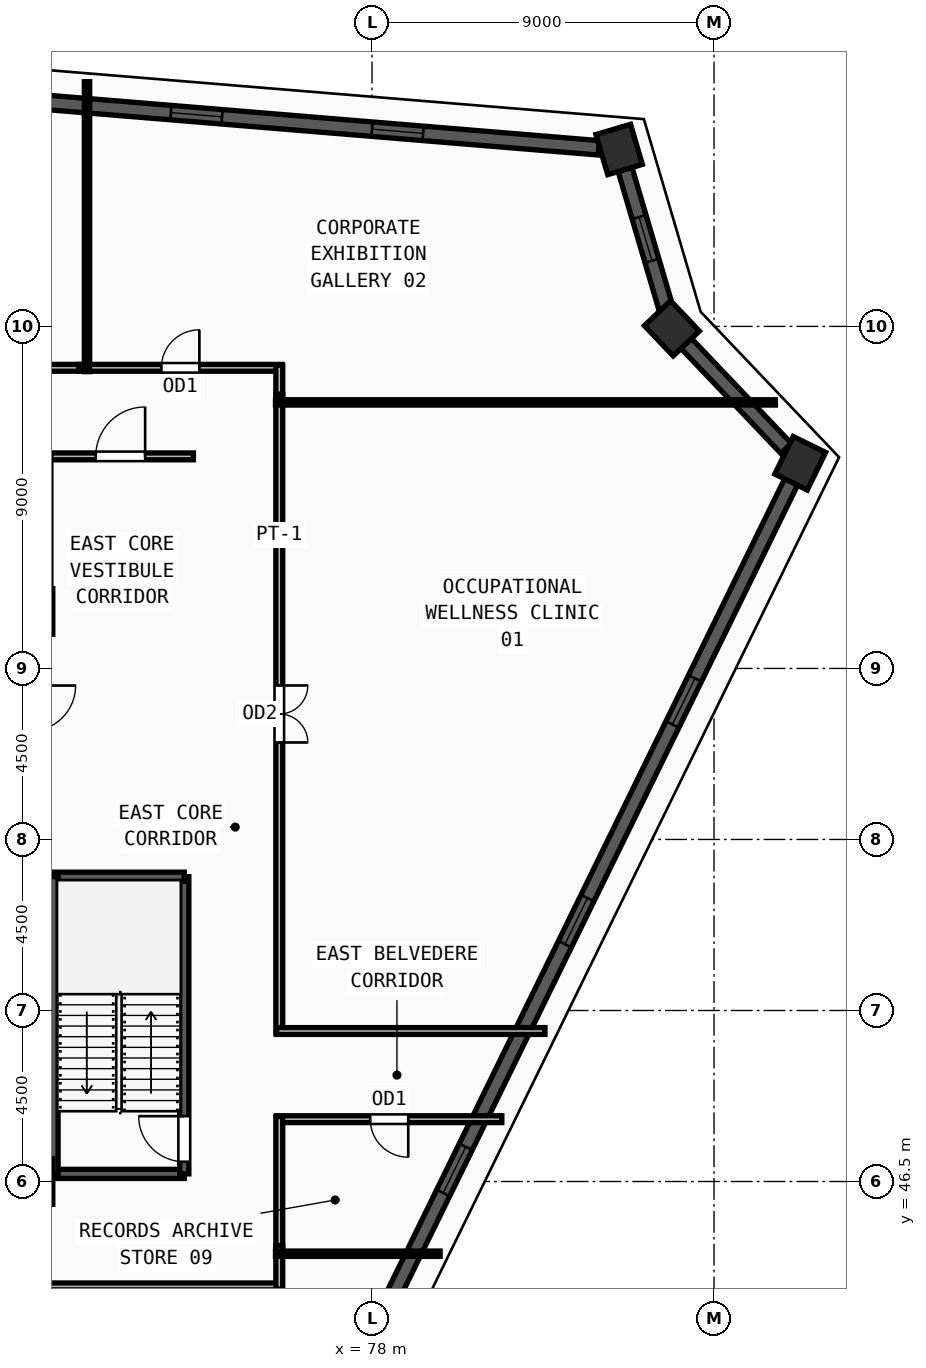
"""IFC4 building model, lengths in metres.
Left out: names, types, materials, properties, quantities, classifications, styles, units other than length and angle.
Written with IfcOpenShell. Run it as: python <this file> out.ifc"""

import sys

from ifc_helpers import new_model, si_unit, direction, frame, frame_2d, origin, origin_2d, place, context, subcontext, project, spatial, rectangle, extrude, source, transform, mapped, element, fill, save


model = new_model("IFC4")
c1 = context("Model", 3, precision=1e-05, world=origin(), true_north=direction((0.0, 1.0)))
c2 = subcontext(c1, "Body", "Model", "MODEL_VIEW")
j1 = project(units=[si_unit("LENGTHUNIT", "METRE"), si_unit("PLANEANGLEUNIT", "RADIAN")], contexts=[c1])
p1 = place(None, origin())
s1 = spatial("IfcSite", under=j1, at=p1, CompositionType="ELEMENT")
p2 = place(p1, origin())
s2 = spatial("IfcBuilding", under=s1, at=p2, CompositionType="ELEMENT")
p3 = place(p2, frame((0.0, 0.0, 328.5)))
s3 = spatial("IfcBuildingStorey", under=s2, at=p3, CompositionType="ELEMENT", Elevation=328.5)
m1 = source(origin(), c2, "Body", "SweptSolid", [
    extrude(rectangle(XDim=1.2, YDim=1.2, at=origin_2d()), origin(), (0.0, 0.0, 1.0), 3.75),
])
for number, where, z_axis, x_axis in (
    (1, (69.0, 46.5, 0.0), (0.0, 0.0, 1.0), (1.0, 0.0, 0.0)),
    (2, (69.0, 61.5, 0.0), (0.0, 0.0, 1.0), (1.0, 0.0, 0.0)),
):
    element("IfcColumn", number, at=place(p3, frame(where, z_axis=z_axis, x_axis=x_axis)), inside=s3, PredefinedType="COLUMN", context=c2, shape_type="MappedRepresentation", body=[
        mapped(m1, transform((0.0, 0.0, 0.0), x_axis=(1.0, 0.0, 0.0), y_axis=(0.0, 1.0, 0.0), z_axis=(0.0, 0.0, 1.0), scale=1.0)),
    ])
m2 = source(origin(), c2, "Body", "SweptSolid", [
    extrude(rectangle(XDim=1.1, YDim=0.95, at=origin_2d()), origin(), (0.0, 0.0, 1.0), 3.75),
])
for number, where, z_axis, x_axis in (
    (3, (84.503, 73.655, 0.0), (0.0, 0.0, 1.0), (-0.283, 0.959, 0.0)),
    (4, (85.891, 68.948, 0.0), (0.0, 0.0, 1.0), (-0.689, 0.724, 0.0)),
    (5, (89.268, 65.399, 0.0), (0.0, 0.0, 1.0), (0.439, 0.898, 0.0)),
):
    element("IfcColumn", number, at=place(p3, frame(where, z_axis=z_axis, x_axis=x_axis)), inside=s3, PredefinedType="COLUMN", context=c2, shape_type="MappedRepresentation", body=[
        mapped(m2, transform((0.0, 0.0, 0.0), x_axis=(1.0, 0.0, 0.0), y_axis=(0.0, 1.0, 0.0), z_axis=(0.0, 0.0, 1.0), scale=1.0)),
    ])
p4 = place(p3, frame((77.714, 41.787, 0.0), z_axis=(0.0, 0.0, 1.0), x_axis=(0.439535610403, 0.898225165083, 0.0)))
e6 = element("IfcWall", 6, at=p4, inside=s3, PredefinedType="SOLIDWALL", context=c2, shape_type="SweptSolid", body=[
    extrude(rectangle(XDim=25.747, YDim=0.38, at=frame_2d((12.874, 0.0))), origin(), (0.0, 0.0, 1.0), 3.57),
])
m3 = source(origin(), c2, "Body", "SweptSolid", [
    extrude(rectangle(XDim=1.35, YDim=1.85, at=frame_2d((0.675, 0.925))), frame((0.0, 0.2, 0.0), z_axis=(0.0, -1.0, 0.0), x_axis=(1.0, 0.0, 0.0)), (0.0, 0.0, 1.0), 0.4),
])
p5 = place(p4, frame((4.912, 0.0, 0.55)))
e7 = element("IfcOpeningElement", 7, at=p5, cuts=e6, PredefinedType="OPENING", context=c2, shape_type="MappedRepresentation", body=[
    mapped(m3, transform((0.0, 0.0, 0.0), x_axis=(1.0, 0.0, 0.0), y_axis=(0.0, 1.0, 0.0), z_axis=(0.0, 0.0, 1.0), scale=1.0)),
])
p6 = place(p4, frame((12.199, 0.0, 0.55)))
e8 = element("IfcOpeningElement", 8, at=p6, cuts=e6, PredefinedType="OPENING", context=c2, shape_type="MappedRepresentation", body=[
    mapped(m3, transform((0.0, 0.0, 0.0), x_axis=(1.0, 0.0, 0.0), y_axis=(0.0, 1.0, 0.0), z_axis=(0.0, 0.0, 1.0), scale=1.0)),
])
p7 = place(p4, frame((18.636, 0.0, 0.55)))
e9 = element("IfcOpeningElement", 9, at=p7, cuts=e6, PredefinedType="OPENING", context=c2, shape_type="MappedRepresentation", body=[
    mapped(m3, transform((0.0, 0.0, 0.0), x_axis=(1.0, 0.0, 0.0), y_axis=(0.0, 1.0, 0.0), z_axis=(0.0, 0.0, 1.0), scale=1.0)),
])
p8 = place(p3, frame((88.896, 65.79, 0.0), z_axis=(0.0, 0.0, 1.0), x_axis=(-0.689375804196, 0.724403893273, 0.0)))
e10 = element("IfcWall", 10, at=p8, inside=s3, PredefinedType="SOLIDWALL", context=c2, shape_type="SweptSolid", body=[
    extrude(rectangle(XDim=3.82, YDim=0.38, at=frame_2d((1.91, 0.0))), origin(), (0.0, 0.0, 1.0), 3.57),
])
p9 = place(p3, frame((85.738, 69.466, 0.0), z_axis=(0.0, 0.0, 1.0), x_axis=(-0.282732695887, 0.959198739926, 0.0)))
e11 = element("IfcWall", 11, at=p9, inside=s3, PredefinedType="SOLIDWALL", context=c2, shape_type="SweptSolid", body=[
    extrude(rectangle(XDim=3.827, YDim=0.38, at=frame_2d((1.914, 0.0))), origin(), (0.0, 0.0, 1.0), 3.57),
])
m4 = source(origin(), c2, "Body", "SweptSolid", [
    extrude(rectangle(XDim=1.2, YDim=1.9, at=frame_2d((0.6, 0.95))), frame((0.0, 0.2, 0.0), z_axis=(0.0, -1.0, 0.0), x_axis=(1.0, 0.0, 0.0)), (0.0, 0.0, 1.0), 0.4),
])
p10 = place(p9, frame((1.314, 0.0, 0.55)))
e12 = element("IfcOpeningElement", 12, at=p10, cuts=e11, PredefinedType="OPENING", context=c2, shape_type="MappedRepresentation", body=[
    mapped(m4, transform((0.0, 0.0, 0.0), x_axis=(1.0, 0.0, 0.0), y_axis=(0.0, 1.0, 0.0), z_axis=(0.0, 0.0, 1.0), scale=1.0)),
])
p11 = place(p3, frame((83.965, 73.699, 0.0), z_axis=(0.0, 0.0, 1.0), x_axis=(-0.996631543612, 0.082009549916, 0.0)))
e13 = element("IfcWall", 13, at=p11, inside=s3, PredefinedType="SOLIDWALL", context=c2, shape_type="SweptSolid", body=[
    extrude(rectangle(XDim=21.241, YDim=0.38, at=frame_2d((10.62, 0.0))), origin(), (0.0, 0.0, 1.0), 3.57),
])
p12 = place(p11, frame((4.635, 0.0, 0.55)))
e14 = element("IfcOpeningElement", 14, at=p12, cuts=e13, PredefinedType="OPENING", context=c2, shape_type="MappedRepresentation", body=[
    mapped(m3, transform((0.0, 0.0, 0.0), x_axis=(1.0, 0.0, 0.0), y_axis=(0.0, 1.0, 0.0), z_axis=(0.0, 0.0, 1.0), scale=1.0)),
])
p13 = place(p11, frame((9.945, 0.0, 0.55)))
e15 = element("IfcOpeningElement", 15, at=p13, cuts=e13, PredefinedType="OPENING", context=c2, shape_type="MappedRepresentation", body=[
    mapped(m3, transform((0.0, 0.0, 0.0), x_axis=(1.0, 0.0, 0.0), y_axis=(0.0, 1.0, 0.0), z_axis=(0.0, 0.0, 1.0), scale=1.0)),
])
p14 = place(p11, frame((15.255, 0.0, 0.55)))
e16 = element("IfcOpeningElement", 16, at=p14, cuts=e13, PredefinedType="OPENING", context=c2, shape_type="MappedRepresentation", body=[
    mapped(m3, transform((0.0, 0.0, 0.0), x_axis=(1.0, 0.0, 0.0), y_axis=(0.0, 1.0, 0.0), z_axis=(0.0, 0.0, 1.0), scale=1.0)),
])
p15 = place(p3, frame((69.62, 46.7, 0.0), z_axis=(0.0, 0.0, 1.0), x_axis=(1.0, 0.0, 0.0)))
e17 = element("IfcWall", 17, at=p15, inside=s3, PredefinedType="SOLIDWALL", context=c2, shape_type="SweptSolid", body=[
    extrude(rectangle(XDim=3.44, YDim=0.24, at=frame_2d((1.72, 0.0))), origin(), (0.0, 0.0, 1.0), 3.57),
])
p16 = place(p3, frame((73.06, 46.7, 0.0), z_axis=(0.0, 0.0, 1.0), x_axis=(0.0, 1.0, 0.0)))
e18 = element("IfcWall", 18, at=p16, inside=s3, PredefinedType="SOLIDWALL", context=c2, shape_type="SweptSolid", body=[
    extrude(rectangle(XDim=7.82, YDim=0.24, at=frame_2d((3.91, 0.0))), origin(), (0.0, 0.0, 1.0), 3.57),
])
m5 = source(origin(), c2, "Body", "SweptSolid", [
    extrude(rectangle(XDim=1.2, YDim=2.2, at=frame_2d((0.6, 1.1))), frame((0.0, 0.13, 0.0), z_axis=(0.0, -1.0, 0.0), x_axis=(1.0, 0.0, 0.0)), (0.0, 0.0, 1.0), 0.26),
])
p17 = place(p16, frame((0.32, 0.0, 0.0)))
e19 = element("IfcOpeningElement", 19, at=p17, cuts=e18, PredefinedType="OPENING", context=c2, shape_type="MappedRepresentation", body=[
    mapped(m5, transform((0.0, 0.0, 0.0), x_axis=(1.0, 0.0, 0.0), y_axis=(0.0, 1.0, 0.0), z_axis=(0.0, 0.0, 1.0), scale=1.0)),
])
p18 = place(p3, frame((73.06, 54.52, 0.0), z_axis=(0.0, 0.0, 1.0), x_axis=(-1.0, 0.0, 0.0)))
e20 = element("IfcWall", 20, at=p18, inside=s3, PredefinedType="SOLIDWALL", context=c2, shape_type="SweptSolid", body=[
    extrude(rectangle(XDim=3.44, YDim=0.24, at=frame_2d((1.72, 0.0))), origin(), (0.0, 0.0, 1.0), 3.57),
])
p19 = place(p3, frame((69.62, 54.52, 0.0), z_axis=(0.0, 0.0, 1.0), x_axis=(0.0, -1.0, 0.0)))
e21 = element("IfcWall", 21, at=p19, inside=s3, PredefinedType="SOLIDWALL", context=c2, shape_type="SweptSolid", body=[
    extrude(rectangle(XDim=7.82, YDim=0.24, at=frame_2d((3.91, 0.0))), origin(), (0.0, 0.0, 1.0), 3.57),
])
p20 = place(p3, frame((69.46, 65.58, 0.0), z_axis=(0.0, 0.0, 1.0), x_axis=(1.0, 0.0, 0.0)))
e22 = element("IfcWall", 22, at=p20, inside=s3, PredefinedType="PARTITIONING", context=c2, shape_type="SweptSolid", body=[
    extrude(rectangle(XDim=3.84, YDim=0.18, at=frame_2d((1.92, 0.0))), origin(), (0.0, 0.0, 1.0), 3.57),
])
m6 = source(origin(), c2, "Body", "SweptSolid", [
    extrude(rectangle(XDim=1.3, YDim=2.2, at=frame_2d((0.65, 1.1))), frame((0.0, 0.1, 0.0), z_axis=(0.0, -1.0, 0.0), x_axis=(1.0, 0.0, 0.0)), (0.0, 0.0, 1.0), 0.2),
])
p21 = place(p20, frame((1.27, 0.0, 0.0)))
e23 = element("IfcOpeningElement", 23, at=p21, cuts=e22, PredefinedType="OPENING", context=c2, shape_type="MappedRepresentation", body=[
    mapped(m6, transform((0.0, 0.0, 0.0), x_axis=(1.0, 0.0, 0.0), y_axis=(0.0, 1.0, 0.0), z_axis=(0.0, 0.0, 1.0), scale=1.0)),
])
p22 = place(p3, frame((75.56, 67.215, 0.0), z_axis=(0.0, 0.0, 1.0), x_axis=(0.0, -1.0, 0.0)))
e24 = element("IfcWall", 24, at=p22, inside=s3, PredefinedType="PARTITIONING", context=c2, shape_type="SweptSolid", body=[
    extrude(rectangle(XDim=16.825, YDim=0.18, at=frame_2d((8.413, 0.0))), origin(), (0.0, 0.0, 1.0), 3.57),
])
m7 = source(origin(), c2, "Body", "SweptSolid", [
    extrude(rectangle(XDim=1.5, YDim=2.2, at=frame_2d((0.75, 1.1))), frame((0.0, 0.1, 0.0), z_axis=(0.0, -1.0, 0.0), x_axis=(1.0, 0.0, 0.0)), (0.0, 0.0, 1.0), 0.2),
])
p23 = place(p22, frame((7.663, 0.0, 0.0)))
e25 = element("IfcOpeningElement", 25, at=p23, cuts=e24, PredefinedType="OPENING", context=c2, shape_type="MappedRepresentation", body=[
    mapped(m7, transform((0.0, 0.0, 0.0), x_axis=(1.0, 0.0, 0.0), y_axis=(0.0, 1.0, 0.0), z_axis=(0.0, 0.0, 1.0), scale=1.0)),
])
p24 = place(p3, frame((70.285, 67.91, 0.0), z_axis=(0.0, 0.0, 1.0), x_axis=(1.0, 0.0, 0.0)))
e26 = element("IfcWall", 26, at=p24, inside=s3, PredefinedType="PARTITIONING", context=c2, shape_type="SweptSolid", body=[
    extrude(rectangle(XDim=5.345, YDim=0.18, at=frame_2d((2.672, 0.0))), origin(), (0.0, 0.0, 1.0), 3.57),
])
m8 = source(origin(), c2, "Body", "SweptSolid", [
    extrude(rectangle(XDim=1.0, YDim=2.2, at=frame_2d((0.5, 1.1))), frame((0.0, 0.1, 0.0), z_axis=(0.0, -1.0, 0.0), x_axis=(1.0, 0.0, 0.0)), (0.0, 0.0, 1.0), 0.2),
])
p25 = place(p24, frame((2.172, 0.0, 0.0)))
e27 = element("IfcOpeningElement", 27, at=p25, cuts=e26, PredefinedType="OPENING", context=c2, shape_type="MappedRepresentation", body=[
    mapped(m8, transform((0.0, 0.0, 0.0), x_axis=(1.0, 0.0, 0.0), y_axis=(0.0, 1.0, 0.0), z_axis=(0.0, 0.0, 1.0), scale=1.0)),
])
p26 = place(p3, frame((62.285, 67.91, 0.0), z_axis=(0.0, 0.0, 1.0), x_axis=(1.0, 0.0, 0.0)))
e28 = element("IfcWall", 28, at=p26, inside=s3, PredefinedType="PARTITIONING", context=c2, shape_type="SweptSolid", body=[
    extrude(rectangle(XDim=8.0, YDim=0.18, at=frame_2d((4.0, 0.0))), origin(), (0.0, 0.0, 1.0), 3.57),
])
p27 = place(p26, frame((3.5, 0.0, 0.0)))
e29 = element("IfcOpeningElement", 29, at=p27, cuts=e28, PredefinedType="OPENING", context=c2, shape_type="MappedRepresentation", body=[
    mapped(m8, transform((0.0, 0.0, 0.0), x_axis=(1.0, 0.0, 0.0), y_axis=(0.0, 1.0, 0.0), z_axis=(0.0, 0.0, 1.0), scale=1.0)),
])
p28 = place(p3, frame((75.63, 43.74, 0.0), z_axis=(0.0, 0.0, 1.0), x_axis=(-1.0, 0.0, 0.0)))
e30 = element("IfcWall", 30, at=p28, inside=s3, PredefinedType="PARTITIONING", context=c2, shape_type="SweptSolid", body=[
    extrude(rectangle(XDim=31.26, YDim=0.18, at=frame_2d((15.63, 0.0))), origin(), (0.0, 0.0, 1.0), 3.57),
])
p29 = place(p28, frame((10.68, 0.0, 0.0)))
e31 = element("IfcOpeningElement", 31, at=p29, cuts=e30, PredefinedType="OPENING", context=c2, shape_type="MappedRepresentation", body=[
    mapped(m7, transform((0.0, 0.0, 0.0), x_axis=(1.0, 0.0, 0.0), y_axis=(0.0, 1.0, 0.0), z_axis=(0.0, 0.0, 1.0), scale=1.0)),
])
p30 = place(p3, frame((81.416, 48.14, 0.0), z_axis=(0.0, 0.0, 1.0), x_axis=(-1.0, 0.0, 0.0)))
e32 = element("IfcWall", 32, at=p30, inside=s3, PredefinedType="PARTITIONING", context=c2, shape_type="SweptSolid", body=[
    extrude(rectangle(XDim=5.926, YDim=0.18, at=frame_2d((2.963, 0.0))), origin(), (0.0, 0.0, 1.0), 3.57),
])
p31 = place(p30, frame((2.463, 0.0, 0.0)))
e33 = element("IfcOpeningElement", 33, at=p31, cuts=e32, PredefinedType="OPENING", context=c2, shape_type="MappedRepresentation", body=[
    mapped(m8, transform((0.0, 0.0, 0.0), x_axis=(1.0, 0.0, 0.0), y_axis=(0.0, 1.0, 0.0), z_axis=(0.0, 0.0, 1.0), scale=1.0)),
])
p32 = place(p3, frame((75.49, 50.46, 0.0), z_axis=(0.0, 0.0, 1.0), x_axis=(1.0, 0.0, 0.0)))
e34 = element("IfcWall", 34, at=p32, inside=s3, PredefinedType="PARTITIONING", context=c2, shape_type="SweptSolid", body=[
    extrude(rectangle(XDim=7.061, YDim=0.18, at=frame_2d((3.531, 0.0))), origin(), (0.0, 0.0, 1.0), 3.57),
])
p33 = place(p3, frame((75.56, 67.98, 0.0), z_axis=(0.0, 0.0, 1.0), x_axis=(0.0, -1.0, 0.0)))
e35 = element("IfcWall", 35, at=p33, inside=s3, PredefinedType="PARTITIONING", context=c2, shape_type="SweptSolid", body=[
    extrude(rectangle(XDim=0.765, YDim=0.18, at=frame_2d((0.382, 0.0))), origin(), (0.0, 0.0, 1.0), 3.57),
])
p34 = place(p3, frame((75.56, 44.815, 0.0), z_axis=(0.0, 0.0, 1.0), x_axis=(0.0, -1.0, 0.0)))
e36 = element("IfcWall", 36, at=p34, inside=s3, PredefinedType="PARTITIONING", context=c2, shape_type="SweptSolid", body=[
    extrude(rectangle(XDim=1.145, YDim=0.18, at=frame_2d((0.573, 0.0))), origin(), (0.0, 0.0, 1.0), 3.57),
])
p35 = place(p3, frame((75.56, 48.21, 0.0), z_axis=(0.0, 0.0, 1.0), x_axis=(0.0, -1.0, 0.0)))
e37 = element("IfcWall", 37, at=p35, inside=s3, PredefinedType="PARTITIONING", context=c2, shape_type="SweptSolid", body=[
    extrude(rectangle(XDim=3.395, YDim=0.18, at=frame_2d((1.698, 0.0))), origin(), (0.0, 0.0, 1.0), 3.57),
])
p36 = place(p3, frame((75.46, 44.6, 0.0), z_axis=(0.0, 0.0, 1.0), x_axis=(1.0, 0.0, 0.0)))
e38 = element("IfcWall", 38, at=p36, inside=s3, PredefinedType="PARTITIONING", context=c2, shape_type="SweptSolid", body=[
    extrude(rectangle(XDim=4.332, YDim=0.14, at=frame_2d((2.166, 0.0))), origin(), (0.0, 0.0, 1.0), 3.57),
])
p37 = place(p3, frame((75.46, 67.0, 0.0), z_axis=(0.0, 0.0, 1.0), x_axis=(1.0, 0.0, 0.0)))
e39 = element("IfcWall", 39, at=p37, inside=s3, PredefinedType="PARTITIONING", context=c2, shape_type="SweptSolid", body=[
    extrude(rectangle(XDim=13.154, YDim=0.14, at=frame_2d((6.577, 0.0))), origin(), (0.0, 0.0, 1.0), 3.57),
])
p38 = place(p3, frame((70.5, 67.81, 0.0), z_axis=(0.0, 0.0, 1.0), x_axis=(0.0, 1.0, 0.0)))
e40 = element("IfcWall", 40, at=p38, inside=s3, PredefinedType="PARTITIONING", context=c2, shape_type="SweptSolid", body=[
    extrude(rectangle(XDim=7.629, YDim=0.14, at=frame_2d((3.814, 0.0))), origin(), (0.0, 0.0, 1.0), 3.57),
])
m9 = source(origin(), c2, "Body", "SweptSolid", [
    extrude(rectangle(XDim=1.35, YDim=1.85, at=frame_2d((0.675, 0.925))), frame((0.0, 0.03, 0.0), z_axis=(0.0, -1.0, 0.0), x_axis=(1.0, 0.0, 0.0)), (0.0, 0.0, 1.0), 0.06),
])
p39 = place(p5, origin())
e41 = element("IfcWindow", 41, at=p39, inside=s3, PartitioningType="SINGLE_PANEL", PredefinedType="WINDOW", context=c2, shape_type="MappedRepresentation", body=[
    mapped(m9, transform((0.0, 0.0, 0.0), x_axis=(1.0, 0.0, 0.0), y_axis=(0.0, 1.0, 0.0), z_axis=(0.0, 0.0, 1.0), scale=1.0)),
])
fill(e7, e41)
p40 = place(p6, origin())
e42 = element("IfcWindow", 42, at=p40, inside=s3, PartitioningType="SINGLE_PANEL", PredefinedType="WINDOW", context=c2, shape_type="MappedRepresentation", body=[
    mapped(m9, transform((0.0, 0.0, 0.0), x_axis=(1.0, 0.0, 0.0), y_axis=(0.0, 1.0, 0.0), z_axis=(0.0, 0.0, 1.0), scale=1.0)),
])
fill(e8, e42)
p41 = place(p7, origin())
e43 = element("IfcWindow", 43, at=p41, inside=s3, PartitioningType="SINGLE_PANEL", PredefinedType="WINDOW", context=c2, shape_type="MappedRepresentation", body=[
    mapped(m9, transform((0.0, 0.0, 0.0), x_axis=(1.0, 0.0, 0.0), y_axis=(0.0, 1.0, 0.0), z_axis=(0.0, 0.0, 1.0), scale=1.0)),
])
fill(e9, e43)
m10 = source(origin(), c2, "Body", "SweptSolid", [
    extrude(rectangle(XDim=1.2, YDim=1.9, at=frame_2d((0.6, 0.95))), frame((0.0, 0.03, 0.0), z_axis=(0.0, -1.0, 0.0), x_axis=(1.0, 0.0, 0.0)), (0.0, 0.0, 1.0), 0.06),
])
p42 = place(p10, origin())
e44 = element("IfcWindow", 44, at=p42, inside=s3, PartitioningType="SINGLE_PANEL", PredefinedType="WINDOW", context=c2, shape_type="MappedRepresentation", body=[
    mapped(m10, transform((0.0, 0.0, 0.0), x_axis=(1.0, 0.0, 0.0), y_axis=(0.0, 1.0, 0.0), z_axis=(0.0, 0.0, 1.0), scale=1.0)),
])
fill(e12, e44)
p43 = place(p12, origin())
e45 = element("IfcWindow", 45, at=p43, inside=s3, PartitioningType="SINGLE_PANEL", PredefinedType="WINDOW", context=c2, shape_type="MappedRepresentation", body=[
    mapped(m9, transform((0.0, 0.0, 0.0), x_axis=(1.0, 0.0, 0.0), y_axis=(0.0, 1.0, 0.0), z_axis=(0.0, 0.0, 1.0), scale=1.0)),
])
fill(e14, e45)
p44 = place(p13, origin())
e46 = element("IfcWindow", 46, at=p44, inside=s3, PartitioningType="SINGLE_PANEL", PredefinedType="WINDOW", context=c2, shape_type="MappedRepresentation", body=[
    mapped(m9, transform((0.0, 0.0, 0.0), x_axis=(1.0, 0.0, 0.0), y_axis=(0.0, 1.0, 0.0), z_axis=(0.0, 0.0, 1.0), scale=1.0)),
])
fill(e15, e46)
m11 = source(origin(), c2, "Body", "SweptSolid", [
    extrude(rectangle(XDim=1.2, YDim=2.2, at=frame_2d((0.6, 1.1))), frame((0.0, 0.025, 0.0), z_axis=(0.0, -1.0, 0.0), x_axis=(1.0, 0.0, 0.0)), (0.0, 0.0, 1.0), 0.05),
])
p45 = place(p17, origin())
e47 = element("IfcDoor", 47, at=p45, inside=s3, OperationType="SINGLE_SWING_RIGHT", PredefinedType="DOOR", context=c2, shape_type="MappedRepresentation", body=[
    mapped(m11, transform((0.0, 0.0, 0.0), x_axis=(1.0, 0.0, 0.0), y_axis=(0.0, 1.0, 0.0), z_axis=(0.0, 0.0, 1.0), scale=1.0)),
])
fill(e19, e47)
m12 = source(origin(), c2, "Body", "SweptSolid", [
    extrude(rectangle(XDim=1.3, YDim=2.2, at=frame_2d((0.65, 1.1))), frame((0.0, 0.025, 0.0), z_axis=(0.0, -1.0, 0.0), x_axis=(1.0, 0.0, 0.0)), (0.0, 0.0, 1.0), 0.05),
])
p46 = place(p21, origin())
e48 = element("IfcDoor", 48, at=p46, inside=s3, OperationType="SINGLE_SWING_RIGHT", PredefinedType="DOOR", context=c2, shape_type="MappedRepresentation", body=[
    mapped(m12, transform((0.0, 0.0, 0.0), x_axis=(1.0, 0.0, 0.0), y_axis=(0.0, 1.0, 0.0), z_axis=(0.0, 0.0, 1.0), scale=1.0)),
])
fill(e23, e48)
m13 = source(origin(), c2, "Body", "SweptSolid", [
    extrude(rectangle(XDim=1.5, YDim=2.2, at=frame_2d((0.75, 1.1))), frame((0.0, 0.025, 0.0), z_axis=(0.0, -1.0, 0.0), x_axis=(1.0, 0.0, 0.0)), (0.0, 0.0, 1.0), 0.05),
])
p47 = place(p23, origin())
e49 = element("IfcDoor", 49, at=p47, inside=s3, OperationType="DOUBLE_DOOR_SINGLE_SWING", PredefinedType="DOOR", context=c2, shape_type="MappedRepresentation", body=[
    mapped(m13, transform((0.0, 0.0, 0.0), x_axis=(1.0, 0.0, 0.0), y_axis=(0.0, 1.0, 0.0), z_axis=(0.0, 0.0, 1.0), scale=1.0)),
])
fill(e25, e49)
m14 = source(origin(), c2, "Body", "SweptSolid", [
    extrude(rectangle(XDim=1.0, YDim=2.2, at=frame_2d((0.5, 1.1))), frame((0.0, 0.025, 0.0), z_axis=(0.0, -1.0, 0.0), x_axis=(1.0, 0.0, 0.0)), (0.0, 0.0, 1.0), 0.05),
])
p48 = place(p25, origin())
e50 = element("IfcDoor", 50, at=p48, inside=s3, OperationType="SINGLE_SWING_RIGHT", PredefinedType="DOOR", context=c2, shape_type="MappedRepresentation", body=[
    mapped(m14, transform((0.0, 0.0, 0.0), x_axis=(1.0, 0.0, 0.0), y_axis=(0.0, 1.0, 0.0), z_axis=(0.0, 0.0, 1.0), scale=1.0)),
])
fill(e27, e50)
p49 = place(p31, origin())
e51 = element("IfcDoor", 51, at=p49, inside=s3, OperationType="SINGLE_SWING_LEFT", PredefinedType="DOOR", context=c2, shape_type="MappedRepresentation", body=[
    mapped(m14, transform((0.0, 0.0, 0.0), x_axis=(1.0, 0.0, 0.0), y_axis=(0.0, 1.0, 0.0), z_axis=(0.0, 0.0, 1.0), scale=1.0)),
])
fill(e33, e51)
save(model, sys.argv[1])
